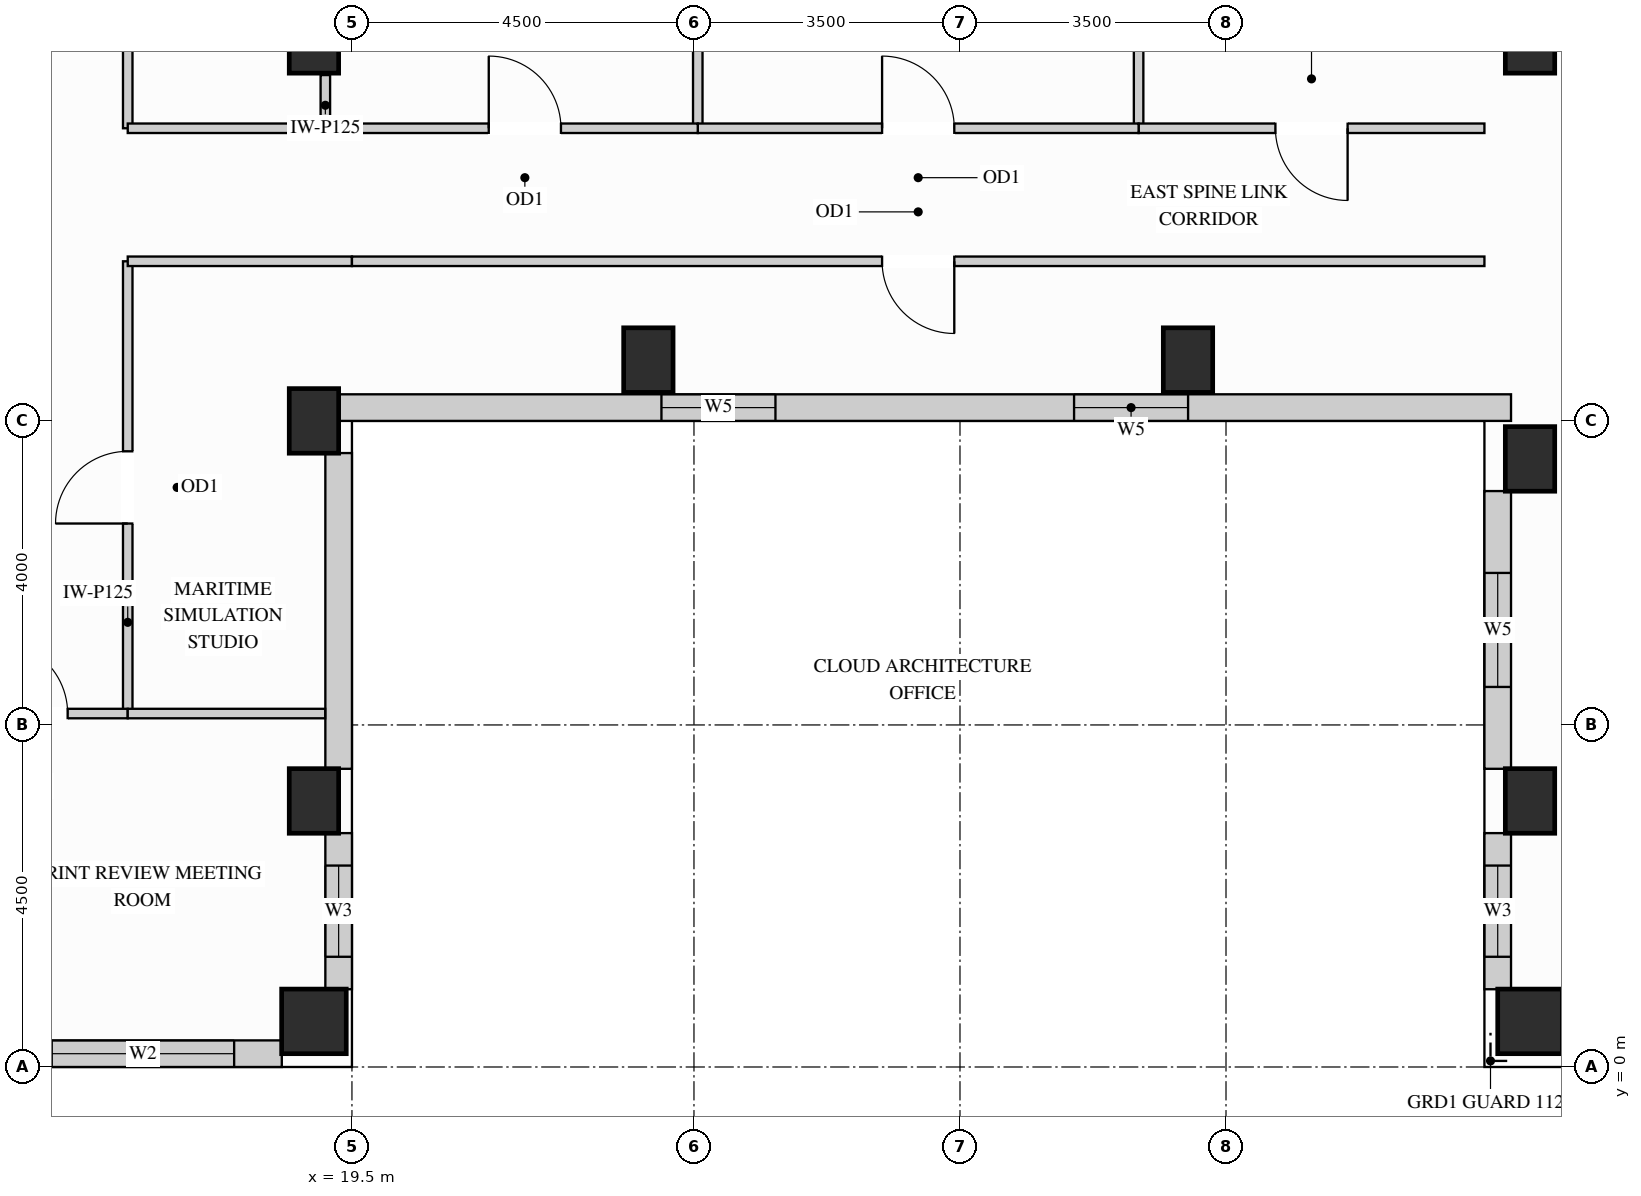
"""IFC4 building model, lengths in metres.
Left out: names, types, materials, properties, quantities, classifications, styles, units other than length and angle.
Written with IfcOpenShell. Run it as: python <this file> out.ifc"""

import sys

from ifc_helpers import new_model, si_unit, direction, frame, frame_2d, origin, origin_2d, place, context, subcontext, project, spatial, rectangle, extrude, source, transform, mapped, element, fill, save


model = new_model("IFC4")
c1 = context("Model", 3, precision=1e-05, world=origin(), true_north=direction((0.0, 1.0)))
c2 = subcontext(c1, "Body", "Model", "MODEL_VIEW")
j1 = project(units=[si_unit("LENGTHUNIT", "METRE"), si_unit("PLANEANGLEUNIT", "RADIAN")], contexts=[c1])
p1 = place(None, origin())
s1 = spatial("IfcSite", under=j1, at=p1, CompositionType="ELEMENT")
p2 = place(p1, origin())
s2 = spatial("IfcBuilding", under=s1, at=p2, CompositionType="ELEMENT")
p3 = place(p2, frame((0.0, 0.0, 234.0)))
s3 = spatial("IfcBuildingStorey", under=s2, at=p3, CompositionType="ELEMENT", Elevation=234.0)
m1 = source(origin(), c2, "Body", "SweptSolid", [
    extrude(rectangle(XDim=0.65, YDim=0.85, at=origin_2d()), origin(), (0.0, 0.0, 1.0), 3.4),
])
for number, where, z_axis, x_axis in (
    (1, (19.0, 13.5, 0.0), (0.0, 0.0, 1.0), (1.0, 0.0, 0.0)),
    (2, (19.0, 3.5, 0.0), (0.0, 0.0, 1.0), (1.0, 0.0, 0.0)),
    (3, (19.0, 8.5, 0.0), (0.0, 0.0, 1.0), (1.0, 0.0, 0.0)),
    (4, (35.0, 13.5, 0.0), (0.0, 0.0, 1.0), (1.0, 0.0, 0.0)),
    (5, (35.0, 3.5, 0.0), (0.0, 0.0, 1.0), (1.0, 0.0, 0.0)),
    (6, (35.0, 8.0, 0.0), (0.0, 0.0, 1.0), (1.0, 0.0, 0.0)),
    (7, (23.4, 9.3, 0.0), (0.0, 0.0, 1.0), (1.0, 0.0, 0.0)),
    (8, (30.5, 9.3, 0.0), (0.0, 0.0, 1.0), (1.0, 0.0, 0.0)),
):
    element("IfcColumn", number, at=place(p3, frame(where, z_axis=z_axis, x_axis=x_axis)), inside=s3, PredefinedType="COLUMN", context=c2, shape_type="MappedRepresentation", body=[
        mapped(m1, transform((0.0, 0.0, 0.0), x_axis=(1.0, 0.0, 0.0), y_axis=(0.0, 1.0, 0.0), z_axis=(0.0, 0.0, 1.0))),
    ])
m2 = source(origin(), c2, "Body", "SweptSolid", [
    extrude(rectangle(XDim=0.85, YDim=0.85, at=origin_2d()), origin(), (0.0, 0.0, 1.0), 3.4),
])
for number, where, z_axis, x_axis in (
    (9, (19.0, 0.6, 0.0), (0.0, 0.0, 1.0), (1.0, 0.0, 0.0)),
    (10, (35.0, 0.6, 0.0), (0.0, 0.0, 1.0), (1.0, 0.0, 0.0)),
):
    element("IfcColumn", number, at=place(p3, frame(where, z_axis=z_axis, x_axis=x_axis)), inside=s3, PredefinedType="COLUMN", context=c2, shape_type="MappedRepresentation", body=[
        mapped(m2, transform((0.0, 0.0, 0.0), x_axis=(1.0, 0.0, 0.0), y_axis=(0.0, 1.0, 0.0), z_axis=(0.0, 0.0, 1.0))),
    ])
p4 = place(p3, frame((14.923, 0.175, 0.0), z_axis=(0.0, 0.0, 1.0), x_axis=(1.0, 0.0, 0.0)))
e11 = element("IfcWall", 11, at=p4, inside=s3, PredefinedType="SOLIDWALL", context=c2, shape_type="SweptSolid", body=[
    extrude(rectangle(XDim=3.654, YDim=0.35, at=frame_2d((1.827, 0.0))), origin(), (0.0, 0.0, 1.0), 3.385),
])
p5 = place(p4, frame((0.627, 0.0, 0.78)))
e12 = element("IfcOpeningElement", 12, at=p5, cuts=e11, PredefinedType="OPENING", context=c2, shape_type="SweptSolid", body=[
    extrude(rectangle(XDim=2.4, YDim=2.1, at=frame_2d((1.2, 1.05))), frame((0.0, 0.185, 0.0), z_axis=(0.0, -1.0, 0.0), x_axis=(1.0, 0.0, 0.0)), (0.0, 0.0, 1.0), 0.37),
])
p6 = place(p3, frame((19.325, 1.023, 0.0), z_axis=(0.0, 0.0, 1.0), x_axis=(0.0, 1.0, 0.0)))
e13 = element("IfcWall", 13, at=p6, inside=s3, PredefinedType="SOLIDWALL", context=c2, shape_type="SweptSolid", body=[
    extrude(rectangle(XDim=2.054, YDim=0.35, at=frame_2d((1.027, 0.0))), origin(), (0.0, 0.0, 1.0), 2.619),
])
p7 = place(p6, frame((0.427, 0.0, 0.78)))
e14 = element("IfcOpeningElement", 14, at=p7, cuts=e13, PredefinedType="OPENING", context=c2, shape_type="SweptSolid", body=[
    extrude(rectangle(XDim=1.2, YDim=1.659, at=frame_2d((0.6, 0.83))), frame((0.0, 0.185, 0.0), z_axis=(0.0, -1.0, 0.0), x_axis=(1.0, 0.0, 0.0)), (0.0, 0.0, 1.0), 0.37),
])
m3 = source(origin(), c2, "Body", "SweptSolid", [
    extrude(rectangle(XDim=4.154, YDim=0.35, at=frame_2d((2.077, 0.0))), origin(), (0.0, 0.0, 1.0), 2.619),
])
p8 = place(p3, frame((19.325, 3.923, 0.0), z_axis=(0.0, 0.0, 1.0), x_axis=(0.0, 1.0, 0.0)))
e15 = element("IfcWall", 15, at=p8, inside=s3, PredefinedType="SOLIDWALL", context=c2, shape_type="MappedRepresentation", body=[
    mapped(m3, transform((0.0, 0.0, 0.0), x_axis=(1.0, 0.0, 0.0), y_axis=(0.0, 1.0, 0.0), z_axis=(0.0, 0.0, 1.0))),
])
p9 = place(p3, frame((19.323, 8.675, 0.0), z_axis=(0.0, 0.0, 1.0), x_axis=(1.0, 0.0, 0.0)))
e16 = element("IfcWall", 16, at=p9, inside=s3, PredefinedType="SOLIDWALL", context=c2, shape_type="SweptSolid", body=[
    extrude(rectangle(XDim=15.427, YDim=0.35, at=frame_2d((7.713, 0.0))), origin(), (0.0, 0.0, 1.0), 3.385),
])
p10 = place(p9, frame((4.249, 0.0, 0.78)))
e17 = element("IfcOpeningElement", 17, at=p10, cuts=e16, PredefinedType="OPENING", context=c2, shape_type="SweptSolid", body=[
    extrude(rectangle(XDim=1.5, YDim=2.0, at=frame_2d((0.75, 1.0))), frame((0.0, 0.185, 0.0), z_axis=(0.0, -1.0, 0.0), x_axis=(1.0, 0.0, 0.0)), (0.0, 0.0, 1.0), 0.37),
])
p11 = place(p9, frame((9.678, 0.0, 0.78)))
e18 = element("IfcOpeningElement", 18, at=p11, cuts=e16, PredefinedType="OPENING", context=c2, shape_type="SweptSolid", body=[
    extrude(rectangle(XDim=1.5, YDim=2.0, at=frame_2d((0.75, 1.0))), frame((0.0, 0.185, 0.0), z_axis=(0.0, -1.0, 0.0), x_axis=(1.0, 0.0, 0.0)), (0.0, 0.0, 1.0), 0.37),
])
p12 = place(p3, frame((34.575, 7.577, 0.0), z_axis=(0.0, 0.0, 1.0), x_axis=(0.0, -1.0, 0.0)))
e19 = element("IfcWall", 19, at=p12, inside=s3, PredefinedType="SOLIDWALL", context=c2, shape_type="SweptSolid", body=[
    extrude(rectangle(XDim=3.654, YDim=0.35, at=frame_2d((1.827, 0.0))), origin(), (0.0, 0.0, 1.0), 3.385),
])
p13 = place(p12, frame((1.077, 0.0, 0.78)))
e20 = element("IfcOpeningElement", 20, at=p13, cuts=e19, PredefinedType="OPENING", context=c2, shape_type="SweptSolid", body=[
    extrude(rectangle(XDim=1.5, YDim=2.0, at=frame_2d((0.75, 1.0))), frame((0.0, 0.185, 0.0), z_axis=(0.0, -1.0, 0.0), x_axis=(1.0, 0.0, 0.0)), (0.0, 0.0, 1.0), 0.37),
])
p14 = place(p3, frame((34.575, 3.077, 0.0), z_axis=(0.0, 0.0, 1.0), x_axis=(0.0, -1.0, 0.0)))
e21 = element("IfcWall", 21, at=p14, inside=s3, PredefinedType="SOLIDWALL", context=c2, shape_type="SweptSolid", body=[
    extrude(rectangle(XDim=2.054, YDim=0.35, at=frame_2d((1.027, 0.0))), origin(), (0.0, 0.0, 1.0), 3.385),
])
p15 = place(p14, frame((0.427, 0.0, 0.78)))
e22 = element("IfcOpeningElement", 22, at=p15, cuts=e21, PredefinedType="OPENING", context=c2, shape_type="SweptSolid", body=[
    extrude(rectangle(XDim=1.2, YDim=2.0, at=frame_2d((0.6, 1.0))), frame((0.0, 0.185, 0.0), z_axis=(0.0, -1.0, 0.0), x_axis=(1.0, 0.0, 0.0)), (0.0, 0.0, 1.0), 0.37),
])
m4 = source(origin(), c2, "Body", "SweptSolid", [
    extrude(rectangle(XDim=0.7, YDim=0.125, at=frame_2d((0.35, 0.0))), origin(), (0.0, 0.0, 1.0), 2.773),
])
p16 = place(p3, frame((19.15, 12.35, 0.0), z_axis=(0.0, 0.0, 1.0), x_axis=(0.0, 1.0, 0.0)))
e23 = element("IfcWall", 23, at=p16, inside=s3, PredefinedType="PARTITIONING", context=c2, shape_type="MappedRepresentation", body=[
    mapped(m4, transform((0.0, 0.0, 0.0), x_axis=(1.0, 0.0, 0.0), y_axis=(0.0, 1.0, 0.0), z_axis=(0.0, 0.0, 1.0))),
])
p17 = place(p3, frame((16.55, 12.35, 0.0), z_axis=(0.0, 0.0, 1.0), x_axis=(0.0, 1.0, 0.0)))
e24 = element("IfcWall", 24, at=p17, inside=s3, PredefinedType="PARTITIONING", context=c2, shape_type="SweptSolid", body=[
    extrude(rectangle(XDim=3.65, YDim=0.125, at=frame_2d((1.825, 0.0))), origin(), (0.0, 0.0, 1.0), 3.385),
])
p18 = place(p17, frame((1.35, 0.0, 0.0)))
e25 = element("IfcOpeningElement", 25, at=p18, cuts=e24, PredefinedType="OPENING", context=c2, shape_type="SweptSolid", body=[
    extrude(rectangle(XDim=0.95, YDim=2.15, at=frame_2d((0.475, 1.075))), frame((0.0, 0.073, 0.0), z_axis=(0.0, -1.0, 0.0), x_axis=(1.0, 0.0, 0.0)), (0.0, 0.0, 1.0), 0.145),
])
p19 = place(p3, frame((16.55, 4.65, 0.0), z_axis=(0.0, 0.0, 1.0), x_axis=(0.0, 1.0, 0.0)))
e26 = element("IfcWall", 26, at=p19, inside=s3, PredefinedType="PARTITIONING", context=c2, shape_type="SweptSolid", body=[
    extrude(rectangle(XDim=5.95, YDim=0.125, at=frame_2d((2.975, 0.0))), origin(), (0.0, 0.0, 1.0), 3.385),
])
p20 = place(p19, frame((2.5, 0.0, 0.0)))
e27 = element("IfcOpeningElement", 27, at=p20, cuts=e26, PredefinedType="OPENING", context=c2, shape_type="SweptSolid", body=[
    extrude(rectangle(XDim=0.95, YDim=2.15, at=frame_2d((0.475, 1.075))), frame((0.0, 0.073, 0.0), z_axis=(0.0, -1.0, 0.0), x_axis=(1.0, 0.0, 0.0)), (0.0, 0.0, 1.0), 0.145),
])
m5 = source(origin(), c2, "Body", "SweptSolid", [
    extrude(rectangle(XDim=3.798, YDim=0.125, at=frame_2d((1.899, 0.0))), origin(), (0.0, 0.0, 1.0), 3.385),
])
for number, where, z_axis, x_axis in (
    (28, (24.05, 12.35, 0.0), (0.0, 0.0, 1.0), (0.0, 1.0, 0.0)),
    (29, (29.85, 12.35, 0.0), (0.0, 0.0, 1.0), (0.0, 1.0, 0.0)),
):
    element("IfcWall", number, at=place(p3, frame(where, z_axis=z_axis, x_axis=x_axis)), inside=s3, PredefinedType="PARTITIONING", context=c2, shape_type="MappedRepresentation", body=[
        mapped(m5, transform((0.0, 0.0, 0.0), x_axis=(1.0, 0.0, 0.0), y_axis=(0.0, 1.0, 0.0), z_axis=(0.0, 0.0, 1.0))),
    ])
p21 = place(p3, frame((29.85, 12.35, 0.0), z_axis=(0.0, 0.0, 1.0), x_axis=(1.0, 0.0, 0.0)))
e30 = element("IfcWall", 30, at=p21, inside=s3, PredefinedType="PARTITIONING", context=c2, shape_type="SweptSolid", body=[
    extrude(rectangle(XDim=4.55, YDim=0.125, at=frame_2d((2.275, 0.0))), origin(), (0.0, 0.0, 1.0), 3.385),
])
p22 = place(p21, frame((1.8, 0.0, 0.0)))
e31 = element("IfcOpeningElement", 31, at=p22, cuts=e30, PredefinedType="OPENING", context=c2, shape_type="SweptSolid", body=[
    extrude(rectangle(XDim=0.95, YDim=2.15, at=frame_2d((0.475, 1.075))), frame((0.0, 0.073, 0.0), z_axis=(0.0, -1.0, 0.0), x_axis=(1.0, 0.0, 0.0)), (0.0, 0.0, 1.0), 0.145),
])
p23 = place(p3, frame((24.05, 12.35, 0.0), z_axis=(0.0, 0.0, 1.0), x_axis=(1.0, 0.0, 0.0)))
e32 = element("IfcWall", 32, at=p23, inside=s3, PredefinedType="PARTITIONING", context=c2, shape_type="SweptSolid", body=[
    extrude(rectangle(XDim=5.8, YDim=0.125, at=frame_2d((2.9, 0.0))), origin(), (0.0, 0.0, 1.0), 3.385),
])
p24 = place(p23, frame((2.425, 0.0, 0.0)))
e33 = element("IfcOpeningElement", 33, at=p24, cuts=e32, PredefinedType="OPENING", context=c2, shape_type="SweptSolid", body=[
    extrude(rectangle(XDim=0.95, YDim=2.15, at=frame_2d((0.475, 1.075))), frame((0.0, 0.073, 0.0), z_axis=(0.0, -1.0, 0.0), x_axis=(1.0, 0.0, 0.0)), (0.0, 0.0, 1.0), 0.145),
])
m6 = source(origin(), c2, "Body", "SweptSolid", [
    extrude(rectangle(XDim=2.95, YDim=0.125, at=frame_2d((1.475, 0.0))), origin(), (0.0, 0.0, 1.0), 3.385),
])
p25 = place(p3, frame((16.55, 12.35, 0.0), z_axis=(0.0, 0.0, 1.0), x_axis=(1.0, 0.0, 0.0)))
e34 = element("IfcWall", 34, at=p25, inside=s3, PredefinedType="PARTITIONING", context=c2, shape_type="MappedRepresentation", body=[
    mapped(m6, transform((0.0, 0.0, 0.0), x_axis=(1.0, 0.0, 0.0), y_axis=(0.0, 1.0, 0.0), z_axis=(0.0, 0.0, 1.0))),
])
p26 = place(p3, frame((19.5, 12.35, 0.0), z_axis=(0.0, 0.0, 1.0), x_axis=(1.0, 0.0, 0.0)))
e35 = element("IfcWall", 35, at=p26, inside=s3, PredefinedType="PARTITIONING", context=c2, shape_type="SweptSolid", body=[
    extrude(rectangle(XDim=4.55, YDim=0.125, at=frame_2d((2.275, 0.0))), origin(), (0.0, 0.0, 1.0), 3.385),
])
p27 = place(p26, frame((1.8, 0.0, 0.0)))
e36 = element("IfcOpeningElement", 36, at=p27, cuts=e35, PredefinedType="OPENING", context=c2, shape_type="SweptSolid", body=[
    extrude(rectangle(XDim=0.95, YDim=2.15, at=frame_2d((0.475, 1.075))), frame((0.0, 0.073, 0.0), z_axis=(0.0, -1.0, 0.0), x_axis=(1.0, 0.0, 0.0)), (0.0, 0.0, 1.0), 0.145),
])
p28 = place(p3, frame((16.55, 10.6, 0.0), z_axis=(0.0, 0.0, 1.0), x_axis=(1.0, 0.0, 0.0)))
e37 = element("IfcWall", 37, at=p28, inside=s3, PredefinedType="PARTITIONING", context=c2, shape_type="MappedRepresentation", body=[
    mapped(m6, transform((0.0, 0.0, 0.0), x_axis=(1.0, 0.0, 0.0), y_axis=(0.0, 1.0, 0.0), z_axis=(0.0, 0.0, 1.0))),
])
p29 = place(p3, frame((19.5, 10.6, 0.0), z_axis=(0.0, 0.0, 1.0), x_axis=(1.0, 0.0, 0.0)))
e38 = element("IfcWall", 38, at=p29, inside=s3, PredefinedType="PARTITIONING", context=c2, shape_type="SweptSolid", body=[
    extrude(rectangle(XDim=14.9, YDim=0.125, at=frame_2d((7.45, 0.0))), origin(), (0.0, 0.0, 1.0), 3.385),
])
p30 = place(p29, frame((6.975, 0.0, 0.0)))
e39 = element("IfcOpeningElement", 39, at=p30, cuts=e38, PredefinedType="OPENING", context=c2, shape_type="SweptSolid", body=[
    extrude(rectangle(XDim=0.95, YDim=2.15, at=frame_2d((0.475, 1.075))), frame((0.0, 0.073, 0.0), z_axis=(0.0, -1.0, 0.0), x_axis=(1.0, 0.0, 0.0)), (0.0, 0.0, 1.0), 0.145),
])
p31 = place(p3, frame((14.019, 4.65, 0.0), z_axis=(0.0, 0.0, 1.0), x_axis=(1.0, 0.0, 0.0)))
e40 = element("IfcWall", 40, at=p31, inside=s3, PredefinedType="PARTITIONING", context=c2, shape_type="SweptSolid", body=[
    extrude(rectangle(XDim=2.531, YDim=0.125, at=frame_2d((1.266, 0.0))), origin(), (0.0, 0.0, 1.0), 2.848),
])
p32 = place(p31, frame((0.791, 0.0, 0.0)))
e41 = element("IfcOpeningElement", 41, at=p32, cuts=e40, PredefinedType="OPENING", context=c2, shape_type="SweptSolid", body=[
    extrude(rectangle(XDim=0.95, YDim=2.15, at=frame_2d((0.475, 1.075))), frame((0.0, 0.073, 0.0), z_axis=(0.0, -1.0, 0.0), x_axis=(1.0, 0.0, 0.0)), (0.0, 0.0, 1.0), 0.145),
])
m7 = source(origin(), c2, "Body", "SweptSolid", [
    extrude(rectangle(XDim=2.598, YDim=0.125, at=frame_2d((1.299, 0.0))), origin(), (0.0, 0.0, 1.0), 2.848),
])
p33 = place(p3, frame((16.55, 4.65, 0.0), z_axis=(0.0, 0.0, 1.0), x_axis=(1.0, 0.0, 0.0)))
e42 = element("IfcWall", 42, at=p33, inside=s3, PredefinedType="PARTITIONING", context=c2, shape_type="MappedRepresentation", body=[
    mapped(m7, transform((0.0, 0.0, 0.0), x_axis=(1.0, 0.0, 0.0), y_axis=(0.0, 1.0, 0.0), z_axis=(0.0, 0.0, 1.0))),
])
m8 = source(origin(), c2, "Body", "SweptSolid", [
    extrude(rectangle(XDim=0.95, YDim=2.15, at=frame_2d((0.475, 1.075))), frame((0.0, 0.025, 0.0), z_axis=(0.0, -1.0, 0.0), x_axis=(1.0, 0.0, 0.0)), (0.0, 0.0, 1.0), 0.05),
])
p34 = place(p20, origin())
e43 = element("IfcDoor", 43, at=p34, inside=s3, OperationType="SINGLE_SWING_LEFT", PredefinedType="DOOR", context=c2, shape_type="MappedRepresentation", body=[
    mapped(m8, transform((0.0, 0.0, 0.0), x_axis=(1.0, 0.0, 0.0), y_axis=(0.0, 1.0, 0.0), z_axis=(0.0, 0.0, 1.0))),
])
fill(e27, e43)
p35 = place(p32, origin())
e44 = element("IfcDoor", 44, at=p35, inside=s3, OperationType="SINGLE_SWING_LEFT", PredefinedType="DOOR", context=c2, shape_type="MappedRepresentation", body=[
    mapped(m8, transform((0.0, 0.0, 0.0), x_axis=(1.0, 0.0, 0.0), y_axis=(0.0, 1.0, 0.0), z_axis=(0.0, 0.0, 1.0))),
])
fill(e41, e44)
p36 = place(p24, origin())
e45 = element("IfcDoor", 45, at=p36, inside=s3, OperationType="SINGLE_SWING_LEFT", PredefinedType="DOOR", context=c2, shape_type="MappedRepresentation", body=[
    mapped(m8, transform((0.0, 0.0, 0.0), x_axis=(1.0, 0.0, 0.0), y_axis=(0.0, 1.0, 0.0), z_axis=(0.0, 0.0, 1.0))),
])
fill(e33, e45)
p37 = place(p27, origin())
e46 = element("IfcDoor", 46, at=p37, inside=s3, OperationType="SINGLE_SWING_LEFT", PredefinedType="DOOR", context=c2, shape_type="MappedRepresentation", body=[
    mapped(m8, transform((0.0, 0.0, 0.0), x_axis=(1.0, 0.0, 0.0), y_axis=(0.0, 1.0, 0.0), z_axis=(0.0, 0.0, 1.0))),
])
fill(e36, e46)
p38 = place(p22, origin())
e47 = element("IfcDoor", 47, at=p38, inside=s3, OperationType="SINGLE_SWING_RIGHT", PredefinedType="DOOR", context=c2, shape_type="MappedRepresentation", body=[
    mapped(m8, transform((0.0, 0.0, 0.0), x_axis=(1.0, 0.0, 0.0), y_axis=(0.0, 1.0, 0.0), z_axis=(0.0, 0.0, 1.0))),
])
fill(e31, e47)
p39 = place(p30, origin())
e48 = element("IfcDoor", 48, at=p39, inside=s3, OperationType="SINGLE_SWING_RIGHT", PredefinedType="DOOR", context=c2, shape_type="MappedRepresentation", body=[
    mapped(m8, transform((0.0, 0.0, 0.0), x_axis=(1.0, 0.0, 0.0), y_axis=(0.0, 1.0, 0.0), z_axis=(0.0, 0.0, 1.0))),
])
fill(e39, e48)
m9 = source(origin(), c2, "Body", "SweptSolid", [
    extrude(rectangle(XDim=2.4, YDim=2.1, at=frame_2d((1.2, 1.05))), frame((0.0, 0.03, 0.0), z_axis=(0.0, -1.0, 0.0), x_axis=(1.0, 0.0, 0.0)), (0.0, 0.0, 1.0), 0.06),
])
p40 = place(p5, origin())
e49 = element("IfcWindow", 49, at=p40, inside=s3, PartitioningType="SINGLE_PANEL", PredefinedType="WINDOW", context=c2, shape_type="MappedRepresentation", body=[
    mapped(m9, transform((0.0, 0.0, 0.0), x_axis=(1.0, 0.0, 0.0), y_axis=(0.0, 1.0, 0.0), z_axis=(0.0, 0.0, 1.0))),
])
fill(e12, e49)
m10 = source(origin(), c2, "Body", "SweptSolid", [
    extrude(rectangle(XDim=1.2, YDim=1.659, at=frame_2d((0.6, 0.83))), frame((0.0, 0.03, 0.0), z_axis=(0.0, -1.0, 0.0), x_axis=(1.0, 0.0, 0.0)), (0.0, 0.0, 1.0), 0.06),
])
p41 = place(p7, origin())
e50 = element("IfcWindow", 50, at=p41, inside=s3, PartitioningType="SINGLE_PANEL", PredefinedType="WINDOW", context=c2, shape_type="MappedRepresentation", body=[
    mapped(m10, transform((0.0, 0.0, 0.0), x_axis=(1.0, 0.0, 0.0), y_axis=(0.0, 1.0, 0.0), z_axis=(0.0, 0.0, 1.0))),
])
fill(e14, e50)
m11 = source(origin(), c2, "Body", "SweptSolid", [
    extrude(rectangle(XDim=1.2, YDim=2.0, at=frame_2d((0.6, 1.0))), frame((0.0, 0.03, 0.0), z_axis=(0.0, -1.0, 0.0), x_axis=(1.0, 0.0, 0.0)), (0.0, 0.0, 1.0), 0.06),
])
p42 = place(p15, origin())
e51 = element("IfcWindow", 51, at=p42, inside=s3, PartitioningType="SINGLE_PANEL", PredefinedType="WINDOW", context=c2, shape_type="MappedRepresentation", body=[
    mapped(m11, transform((0.0, 0.0, 0.0), x_axis=(1.0, 0.0, 0.0), y_axis=(0.0, 1.0, 0.0), z_axis=(0.0, 0.0, 1.0))),
])
fill(e22, e51)
m12 = source(origin(), c2, "Body", "SweptSolid", [
    extrude(rectangle(XDim=1.5, YDim=2.0, at=frame_2d((0.75, 1.0))), frame((0.0, 0.03, 0.0), z_axis=(0.0, -1.0, 0.0), x_axis=(1.0, 0.0, 0.0)), (0.0, 0.0, 1.0), 0.06),
])
p43 = place(p10, origin())
e52 = element("IfcWindow", 52, at=p43, inside=s3, PartitioningType="SINGLE_PANEL", PredefinedType="WINDOW", context=c2, shape_type="MappedRepresentation", body=[
    mapped(m12, transform((0.0, 0.0, 0.0), x_axis=(1.0, 0.0, 0.0), y_axis=(0.0, 1.0, 0.0), z_axis=(0.0, 0.0, 1.0))),
])
fill(e17, e52)
p44 = place(p11, origin())
e53 = element("IfcWindow", 53, at=p44, inside=s3, PartitioningType="SINGLE_PANEL", PredefinedType="WINDOW", context=c2, shape_type="MappedRepresentation", body=[
    mapped(m12, transform((0.0, 0.0, 0.0), x_axis=(1.0, 0.0, 0.0), y_axis=(0.0, 1.0, 0.0), z_axis=(0.0, 0.0, 1.0))),
])
fill(e18, e53)
p45 = place(p13, origin())
e54 = element("IfcWindow", 54, at=p45, inside=s3, PartitioningType="SINGLE_PANEL", PredefinedType="WINDOW", context=c2, shape_type="MappedRepresentation", body=[
    mapped(m12, transform((0.0, 0.0, 0.0), x_axis=(1.0, 0.0, 0.0), y_axis=(0.0, 1.0, 0.0), z_axis=(0.0, 0.0, 1.0))),
])
fill(e20, e54)
save(model, sys.argv[1])
